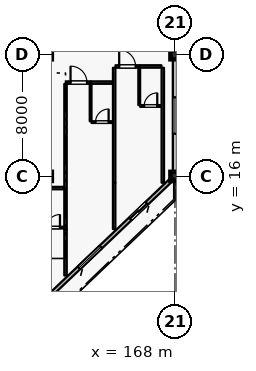
"""IFC4 building model, lengths in metres.
Left out: names, types, materials, properties, quantities, classifications, styles, units other than length and angle.
Written with IfcOpenShell. Run it as: python <this file> out.ifc"""

import sys

from ifc_helpers import new_model, si_unit, direction, frame, frame_2d, origin, origin_2d, place, context, subcontext, project, spatial, rectangle, extrude, element, fill, save


model = new_model("IFC4")
c1 = context("Model", 3, precision=1e-05, world=origin(), true_north=direction((0.0, 1.0)))
c2 = subcontext(c1, "Body", "Model", "MODEL_VIEW")
j1 = project(units=[si_unit("LENGTHUNIT", "METRE"), si_unit("PLANEANGLEUNIT", "RADIAN")], contexts=[c1])
p1 = place(None, origin())
s1 = spatial("IfcSite", under=j1, at=p1, CompositionType="ELEMENT")
p2 = place(p1, origin())
s2 = spatial("IfcBuilding", under=s1, at=p2, CompositionType="ELEMENT")
p3 = place(p2, frame((0.0, 0.0, 39.6)))
s3 = spatial("IfcBuildingStorey", under=s2, at=p3, CompositionType="ELEMENT", Elevation=39.6)
for number, where, z_axis, x_axis in (
    (1, (168.0, 16.0, 0.0), (0.0, 0.0, 1.0), (1.0, 0.0, 0.0)),
    (2, (168.0, 24.0, 0.0), (0.0, 0.0, 1.0), (1.0, 0.0, 0.0)),
):
    element("IfcColumn", number, at=place(p3, frame(where, z_axis=z_axis, x_axis=x_axis)), inside=s3, PredefinedType="COLUMN", context=c2, shape_type="SweptSolid", body=[
        extrude(rectangle(XDim=0.6, YDim=0.6, at=origin_2d()), origin(), (0.0, 0.0, 1.0), 3.6),
    ])
p4 = place(p3, frame((167.7, 15.714, 0.0), z_axis=(0.0, 0.0, 1.0), x_axis=(-0.724156257633, -0.689635928973, 0.0)))
e3 = element("IfcWall", 3, at=p4, inside=s3, PredefinedType="SOLIDWALL", context=c2, shape_type="SweptSolid", body=[
    extrude(rectangle(XDim=10.771, YDim=0.24, at=frame_2d((5.386, 0.0))), origin(), (0.0, 0.0, 1.0), 2.94),
])
p5 = place(p4, frame((2.15, 0.0, 0.0)))
e4 = element("IfcOpeningElement", 4, at=p5, cuts=e3, PredefinedType="OPENING", context=c2, shape_type="SweptSolid", body=[
    extrude(rectangle(XDim=1.5, YDim=2.25, at=frame_2d((0.75, 1.125))), frame((0.0, 0.13, 0.0), z_axis=(0.0, -1.0, 0.0), x_axis=(1.0, 0.0, 0.0)), (0.0, 0.0, 1.0), 0.26),
])
p6 = place(p4, frame((6.319, 0.0, 0.8)))
e5 = element("IfcOpeningElement", 5, at=p6, cuts=e3, PredefinedType="OPENING", context=c2, shape_type="SweptSolid", body=[
    extrude(rectangle(XDim=2.0, YDim=1.75, at=frame_2d((1.0, 0.875))), frame((0.0, 0.13, 0.0), z_axis=(0.0, -1.0, 0.0), x_axis=(1.0, 0.0, 0.0)), (0.0, 0.0, 1.0), 0.26),
])
p7 = place(p3, frame((168.0, 23.7, 0.0), z_axis=(0.0, 0.0, 1.0), x_axis=(0.0, -1.0, 0.0)))
e6 = element("IfcWall", 6, at=p7, inside=s3, PredefinedType="SOLIDWALL", context=c2, shape_type="SweptSolid", body=[
    extrude(rectangle(XDim=7.4, YDim=0.28, at=frame_2d((3.7, 0.0))), origin(), (0.0, 0.0, 1.0), 2.7),
])
p8 = place(p7, frame((2.5, 0.0, 0.5)))
e7 = element("IfcOpeningElement", 7, at=p8, cuts=e6, PredefinedType="OPENING", context=c2, shape_type="SweptSolid", body=[
    extrude(rectangle(XDim=2.4, YDim=1.65, at=frame_2d((1.2, 0.825))), frame((0.0, 0.15, 0.0), z_axis=(0.0, -1.0, 0.0), x_axis=(1.0, 0.0, 0.0)), (0.0, 0.0, 1.0), 0.3),
])
p9 = place(p3, frame((159.26, 15.23, 0.0), z_axis=(0.0, 0.0, 1.0), x_axis=(1.0, 0.0, 0.0)))
e8 = element("IfcWall", 8, at=p9, inside=s3, PredefinedType="PARTITIONING", context=c2, shape_type="SweptSolid", body=[
    extrude(rectangle(XDim=1.45, YDim=0.16, at=frame_2d((0.725, 0.0))), origin(), (0.0, 0.0, 1.0), 3.335),
])
p10 = place(p3, frame((159.31, 12.63, 0.0), z_axis=(0.0, 0.0, 1.0), x_axis=(1.0, 0.0, 0.0)))
e9 = element("IfcWall", 9, at=p10, inside=s3, PredefinedType="PARTITIONING", context=c2, shape_type="SweptSolid", body=[
    extrude(rectangle(XDim=1.39, YDim=0.115, at=frame_2d((0.695, 0.0))), origin(), (0.0, 0.0, 1.0), 3.335),
])
p11 = place(p10, frame((0.265, 0.0, 0.0)))
e10 = element("IfcOpeningElement", 10, at=p11, cuts=e9, PredefinedType="OPENING", context=c2, shape_type="SweptSolid", body=[
    extrude(rectangle(XDim=0.86, YDim=2.12, at=frame_2d((0.43, 1.06))), frame((0.0, 0.067, 0.0), z_axis=(0.0, -1.0, 0.0), x_axis=(1.0, 0.0, 0.0)), (0.0, 0.0, 1.0), 0.135),
])
p12 = place(p3, frame((160.8, 9.48, 0.0), z_axis=(0.0, 0.0, 1.0), x_axis=(0.0, 1.0, 0.0)))
e11 = element("IfcWall", 11, at=p12, inside=s3, PredefinedType="PARTITIONING", context=c2, shape_type="SweptSolid", body=[
    extrude(rectangle(XDim=3.04, YDim=0.16, at=frame_2d((1.52, 0.0))), origin(), (0.0, 0.0, 1.0), 3.335),
])
p13 = place(p3, frame((160.89, 22.17, 0.0), z_axis=(0.0, 0.0, 1.0), x_axis=(1.0, 0.0, 0.0)))
e12 = element("IfcWall", 12, at=p13, inside=s3, PredefinedType="PARTITIONING", context=c2, shape_type="SweptSolid", body=[
    extrude(rectangle(XDim=1.56, YDim=0.16, at=frame_2d((0.78, 0.0))), origin(), (0.0, 0.0, 1.0), 3.335),
])
p14 = place(p13, frame((0.24, 0.0, 0.0)))
e13 = element("IfcOpeningElement", 13, at=p14, cuts=e12, PredefinedType="OPENING", context=c2, shape_type="SweptSolid", body=[
    extrude(rectangle(XDim=1.08, YDim=2.3, at=frame_2d((0.54, 1.15))), frame((0.0, 0.09, 0.0), z_axis=(0.0, -1.0, 0.0), x_axis=(1.0, 0.0, 0.0)), (0.0, 0.0, 1.0), 0.18),
])
p15 = place(p3, frame((162.46, 22.17, 0.0), z_axis=(0.0, 0.0, 1.0), x_axis=(1.0, 0.0, 0.0)))
e14 = element("IfcWall", 14, at=p15, inside=s3, PredefinedType="PARTITIONING", context=c2, shape_type="SweptSolid", body=[
    extrude(rectangle(XDim=1.45, YDim=0.16, at=frame_2d((0.725, 0.0))), origin(), (0.0, 0.0, 1.0), 3.335),
])
p16 = place(p3, frame((162.45, 19.63, 0.0), z_axis=(0.0, 0.0, 1.0), x_axis=(0.0, 1.0, 0.0)))
e15 = element("IfcWall", 15, at=p16, inside=s3, PredefinedType="PARTITIONING", context=c2, shape_type="SweptSolid", body=[
    extrude(rectangle(XDim=2.45, YDim=0.115, at=frame_2d((1.225, 0.0))), origin(), (0.0, 0.0, 1.0), 3.335),
])
p17 = place(p3, frame((162.51, 19.57, 0.0), z_axis=(0.0, 0.0, 1.0), x_axis=(1.0, 0.0, 0.0)))
e16 = element("IfcWall", 16, at=p17, inside=s3, PredefinedType="PARTITIONING", context=c2, shape_type="SweptSolid", body=[
    extrude(rectangle(XDim=1.39, YDim=0.115, at=frame_2d((0.695, 0.0))), origin(), (0.0, 0.0, 1.0), 3.335),
])
p18 = place(p17, frame((0.265, 0.0, 0.0)))
e17 = element("IfcOpeningElement", 17, at=p18, cuts=e16, PredefinedType="OPENING", context=c2, shape_type="SweptSolid", body=[
    extrude(rectangle(XDim=0.86, YDim=2.12, at=frame_2d((0.43, 1.06))), frame((0.0, 0.067, 0.0), z_axis=(0.0, -1.0, 0.0), x_axis=(1.0, 0.0, 0.0)), (0.0, 0.0, 1.0), 0.135),
])
p19 = place(p3, frame((160.8, 12.53, 0.0), z_axis=(0.0, 0.0, 1.0), x_axis=(0.0, 1.0, 0.0)))
e18 = element("IfcWall", 18, at=p19, inside=s3, PredefinedType="PARTITIONING", context=c2, shape_type="SweptSolid", body=[
    extrude(rectangle(XDim=9.55, YDim=0.16, at=frame_2d((4.775, 0.0))), origin(), (0.0, 0.0, 1.0), 3.335),
])
p20 = place(p3, frame((164.0, 12.53, 0.0), z_axis=(0.0, 0.0, 1.0), x_axis=(0.0, 1.0, 0.0)))
e19 = element("IfcWall", 19, at=p20, inside=s3, PredefinedType="PARTITIONING", context=c2, shape_type="SweptSolid", body=[
    extrude(rectangle(XDim=3.04, YDim=0.16, at=frame_2d((1.52, 0.0))), origin(), (0.0, 0.0, 1.0), 3.335),
])
p21 = place(p3, frame((164.09, 23.23, 0.0), z_axis=(0.0, 0.0, 1.0), x_axis=(1.0, 0.0, 0.0)))
e20 = element("IfcWall", 20, at=p21, inside=s3, PredefinedType="PARTITIONING", context=c2, shape_type="SweptSolid", body=[
    extrude(rectangle(XDim=1.56, YDim=0.16, at=frame_2d((0.78, 0.0))), origin(), (0.0, 0.0, 1.0), 3.335),
])
p22 = place(p21, frame((0.24, 0.0, 0.0)))
e21 = element("IfcOpeningElement", 21, at=p22, cuts=e20, PredefinedType="OPENING", context=c2, shape_type="SweptSolid", body=[
    extrude(rectangle(XDim=1.08, YDim=2.3, at=frame_2d((0.54, 1.15))), frame((0.0, 0.09, 0.0), z_axis=(0.0, -1.0, 0.0), x_axis=(1.0, 0.0, 0.0)), (0.0, 0.0, 1.0), 0.18),
])
p23 = place(p3, frame((165.66, 23.23, 0.0), z_axis=(0.0, 0.0, 1.0), x_axis=(1.0, 0.0, 0.0)))
e22 = element("IfcWall", 22, at=p23, inside=s3, PredefinedType="PARTITIONING", context=c2, shape_type="SweptSolid", body=[
    extrude(rectangle(XDim=1.45, YDim=0.16, at=frame_2d((0.725, 0.0))), origin(), (0.0, 0.0, 1.0), 3.335),
])
p24 = place(p3, frame((165.65, 20.69, 0.0), z_axis=(0.0, 0.0, 1.0), x_axis=(0.0, 1.0, 0.0)))
e23 = element("IfcWall", 23, at=p24, inside=s3, PredefinedType="PARTITIONING", context=c2, shape_type="SweptSolid", body=[
    extrude(rectangle(XDim=2.45, YDim=0.115, at=frame_2d((1.225, 0.0))), origin(), (0.0, 0.0, 1.0), 3.335),
])
p25 = place(p3, frame((165.71, 20.63, 0.0), z_axis=(0.0, 0.0, 1.0), x_axis=(1.0, 0.0, 0.0)))
e24 = element("IfcWall", 24, at=p25, inside=s3, PredefinedType="PARTITIONING", context=c2, shape_type="SweptSolid", body=[
    extrude(rectangle(XDim=1.39, YDim=0.115, at=frame_2d((0.695, 0.0))), origin(), (0.0, 0.0, 1.0), 3.335),
])
p26 = place(p25, frame((0.265, 0.0, 0.0)))
e25 = element("IfcOpeningElement", 25, at=p26, cuts=e24, PredefinedType="OPENING", context=c2, shape_type="SweptSolid", body=[
    extrude(rectangle(XDim=0.86, YDim=2.12, at=frame_2d((0.43, 1.06))), frame((0.0, 0.067, 0.0), z_axis=(0.0, -1.0, 0.0), x_axis=(1.0, 0.0, 0.0)), (0.0, 0.0, 1.0), 0.135),
])
for number, where, z_axis, x_axis in (
    (26, (164.0, 15.58, 0.0), (0.0, 0.0, 1.0), (0.0, 1.0, 0.0)),
    (27, (167.2, 15.58, 0.0), (0.0, 0.0, 1.0), (0.0, 1.0, 0.0)),
):
    element("IfcWall", number, at=place(p3, frame(where, z_axis=z_axis, x_axis=x_axis)), inside=s3, PredefinedType="PARTITIONING", context=c2, shape_type="SweptSolid", body=[
        extrude(rectangle(XDim=7.56, YDim=0.16, at=frame_2d((3.78, 0.0))), origin(), (0.0, 0.0, 1.0), 3.335),
    ])
p27 = place(p5, origin())
e28 = element("IfcDoor", 28, at=p27, inside=s3, OperationType="SLIDING_TO_LEFT", PredefinedType="DOOR", context=c2, shape_type="SweptSolid", body=[
    extrude(rectangle(XDim=1.5, YDim=2.25, at=frame_2d((0.75, 1.125))), frame((0.0, 0.025, 0.0), z_axis=(0.0, -1.0, 0.0), x_axis=(1.0, 0.0, 0.0)), (0.0, 0.0, 1.0), 0.05),
])
fill(e4, e28)
p28 = place(p6, origin())
e29 = element("IfcWindow", 29, at=p28, inside=s3, PartitioningType="DOUBLE_PANEL_VERTICAL", PredefinedType="WINDOW", context=c2, shape_type="SweptSolid", body=[
    extrude(rectangle(XDim=2.0, YDim=1.75, at=frame_2d((1.0, 0.875))), frame((0.0, 0.03, 0.0), z_axis=(0.0, -1.0, 0.0), x_axis=(1.0, 0.0, 0.0)), (0.0, 0.0, 1.0), 0.06),
])
fill(e5, e29)
p29 = place(p8, origin())
e30 = element("IfcWindow", 30, at=p29, inside=s3, PartitioningType="DOUBLE_PANEL_VERTICAL", PredefinedType="WINDOW", context=c2, shape_type="SweptSolid", body=[
    extrude(rectangle(XDim=2.4, YDim=1.65, at=frame_2d((1.2, 0.825))), frame((0.0, 0.03, 0.0), z_axis=(0.0, -1.0, 0.0), x_axis=(1.0, 0.0, 0.0)), (0.0, 0.0, 1.0), 0.06),
])
fill(e7, e30)
p30 = place(p11, origin())
e31 = element("IfcDoor", 31, at=p30, inside=s3, OperationType="SINGLE_SWING_RIGHT", PredefinedType="DOOR", context=c2, shape_type="SweptSolid", body=[
    extrude(rectangle(XDim=0.86, YDim=2.12, at=frame_2d((0.43, 1.06))), frame((0.0, 0.025, 0.0), z_axis=(0.0, -1.0, 0.0), x_axis=(1.0, 0.0, 0.0)), (0.0, 0.0, 1.0), 0.05),
])
fill(e10, e31)
p31 = place(p14, origin())
e32 = element("IfcDoor", 32, at=p31, inside=s3, OperationType="SINGLE_SWING_LEFT", PredefinedType="DOOR", context=c2, shape_type="SweptSolid", body=[
    extrude(rectangle(XDim=1.08, YDim=2.3, at=frame_2d((0.54, 1.15))), frame((0.0, 0.025, 0.0), z_axis=(0.0, -1.0, 0.0), x_axis=(1.0, 0.0, 0.0)), (0.0, 0.0, 1.0), 0.05),
])
fill(e13, e32)
p32 = place(p18, origin())
e33 = element("IfcDoor", 33, at=p32, inside=s3, OperationType="SINGLE_SWING_RIGHT", PredefinedType="DOOR", context=c2, shape_type="SweptSolid", body=[
    extrude(rectangle(XDim=0.86, YDim=2.12, at=frame_2d((0.43, 1.06))), frame((0.0, 0.025, 0.0), z_axis=(0.0, -1.0, 0.0), x_axis=(1.0, 0.0, 0.0)), (0.0, 0.0, 1.0), 0.05),
])
fill(e17, e33)
p33 = place(p22, origin())
e34 = element("IfcDoor", 34, at=p33, inside=s3, OperationType="SINGLE_SWING_LEFT", PredefinedType="DOOR", context=c2, shape_type="SweptSolid", body=[
    extrude(rectangle(XDim=1.08, YDim=2.3, at=frame_2d((0.54, 1.15))), frame((0.0, 0.025, 0.0), z_axis=(0.0, -1.0, 0.0), x_axis=(1.0, 0.0, 0.0)), (0.0, 0.0, 1.0), 0.05),
])
fill(e21, e34)
p34 = place(p26, origin())
e35 = element("IfcDoor", 35, at=p34, inside=s3, OperationType="SINGLE_SWING_RIGHT", PredefinedType="DOOR", context=c2, shape_type="SweptSolid", body=[
    extrude(rectangle(XDim=0.86, YDim=2.12, at=frame_2d((0.43, 1.06))), frame((0.0, 0.025, 0.0), z_axis=(0.0, -1.0, 0.0), x_axis=(1.0, 0.0, 0.0)), (0.0, 0.0, 1.0), 0.05),
])
fill(e25, e35)
save(model, sys.argv[1])
